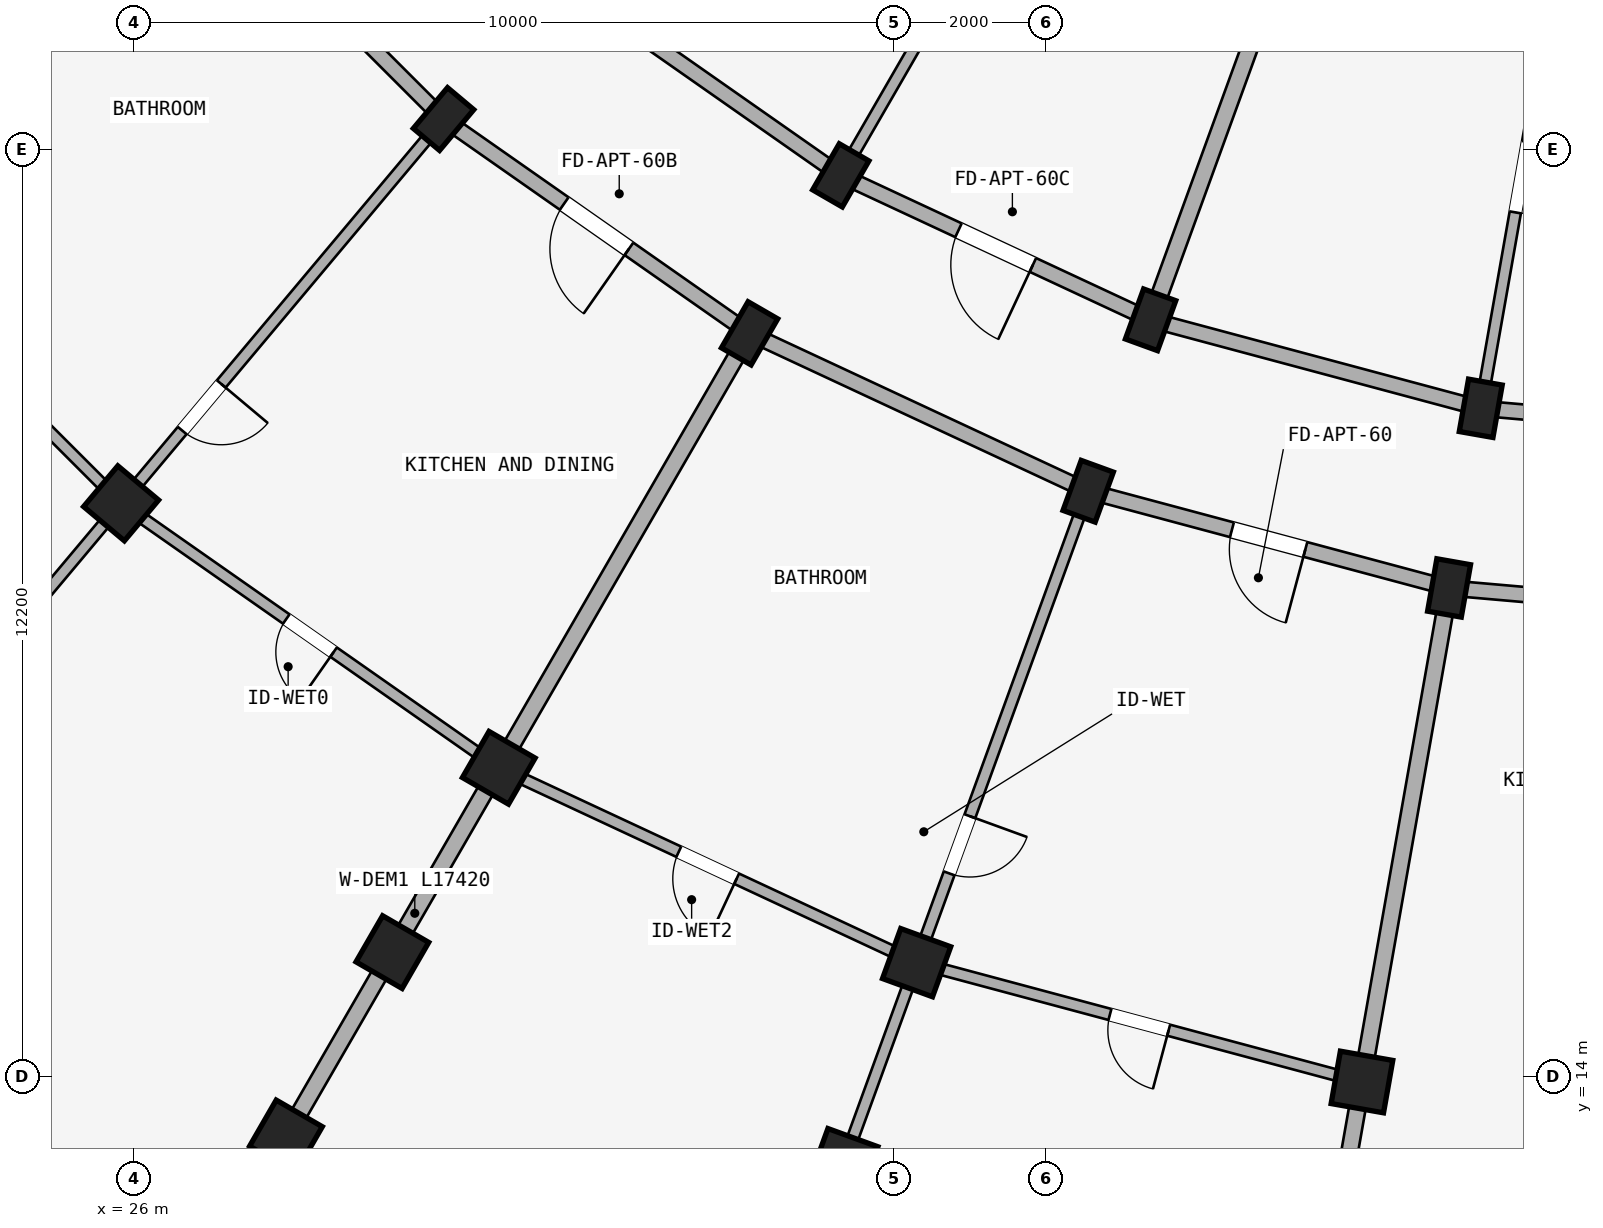
"""IFC4 building model, lengths in metres.
Left out: names, types, materials, properties, quantities, classifications, styles, units other than length and angle.
Written with IfcOpenShell. Run it as: python <this file> out.ifc"""

import sys

from ifc_helpers import new_model, si_unit, direction, frame, frame_2d, origin, origin_2d, place, context, subcontext, project, spatial, rectangle, extrude, element, fill, save


model = new_model("IFC4")
c1 = context("Model", 3, precision=1e-05, world=origin(), true_north=direction((0.0, 1.0)))
c2 = subcontext(c1, "Body", "Model", "MODEL_VIEW")
j1 = project(units=[si_unit("LENGTHUNIT", "METRE"), si_unit("PLANEANGLEUNIT", "RADIAN")], contexts=[c1])
p1 = place(None, origin())
s1 = spatial("IfcSite", under=j1, at=p1, CompositionType="ELEMENT")
p2 = place(p1, origin())
s2 = spatial("IfcBuilding", under=s1, at=p2, CompositionType="ELEMENT")
p3 = place(p2, frame((0.0, 0.0, 18.15)))
s3 = spatial("IfcBuildingStorey", under=s2, at=p3, CompositionType="ELEMENT", Elevation=18.15)
for number, where, z_axis, x_axis in (
    (1, (43.72, 22.792, 0.0), (0.0, 0.0, 1.0), (-0.985, 0.174, 0.0)),
    (2, (43.303, 20.428, 0.0), (0.0, 0.0, 1.0), (-0.985, 0.174, 0.0)),
):
    element("IfcColumn", number, at=place(p3, frame(where, z_axis=z_axis, x_axis=x_axis)), inside=s3, PredefinedType="COLUMN", context=c2, shape_type="SweptSolid", body=[
        extrude(rectangle(XDim=0.45, YDim=0.7, at=origin_2d()), origin(), (0.0, 0.0, 1.0), 2.93),
    ])
p4 = place(p3, frame((42.157, 13.929, 0.0), z_axis=(0.0, 0.0, 1.0), x_axis=(-0.984807753012, 0.173648177667, 0.0)))
e3 = element("IfcColumn", 3, at=p4, inside=s3, PredefinedType="COLUMN", context=c2, shape_type="SweptSolid", body=[
    extrude(rectangle(XDim=0.7, YDim=0.7, at=origin_2d()), origin(), (0.0, 0.0, 1.0), 2.93),
])
for number, where, z_axis, x_axis in (
    (4, (39.376, 23.956, 0.0), (0.0, 0.0, 1.0), (-0.94, 0.342, 0.0)),
    (5, (38.555, 21.701, 0.0), (0.0, 0.0, 1.0), (-0.94, 0.342, 0.0)),
):
    element("IfcColumn", number, at=place(p3, frame(where, z_axis=z_axis, x_axis=x_axis)), inside=s3, PredefinedType="COLUMN", context=c2, shape_type="SweptSolid", body=[
        extrude(rectangle(XDim=0.45, YDim=0.7, at=origin_2d()), origin(), (0.0, 0.0, 1.0), 2.93),
    ])
for number, where, z_axis, x_axis in (
    (6, (36.298, 15.499, 0.0), (0.0, 0.0, 1.0), (-0.94, 0.342, 0.0)),
    (7, (35.34, 12.868, 0.0), (0.0, 0.0, 1.0), (-0.94, 0.342, 0.0)),
):
    element("IfcColumn", number, at=place(p3, frame(where, z_axis=z_axis, x_axis=x_axis)), inside=s3, PredefinedType="COLUMN", context=c2, shape_type="SweptSolid", body=[
        extrude(rectangle(XDim=0.7, YDim=0.7, at=origin_2d()), origin(), (0.0, 0.0, 1.0), 2.93),
    ])
for number, where, z_axis, x_axis in (
    (8, (35.3, 25.856, 0.0), (0.0, 0.0, 1.0), (-0.866, 0.5, 0.0)),
    (9, (34.1, 23.778, 0.0), (0.0, 0.0, 1.0), (-0.866, 0.5, 0.0)),
):
    element("IfcColumn", number, at=place(p3, frame(where, z_axis=z_axis, x_axis=x_axis)), inside=s3, PredefinedType="COLUMN", context=c2, shape_type="SweptSolid", body=[
        extrude(rectangle(XDim=0.45, YDim=0.7, at=origin_2d()), origin(), (0.0, 0.0, 1.0), 2.93),
    ])
for number, where, z_axis, x_axis in (
    (10, (30.8, 18.062, 0.0), (0.0, 0.0, 1.0), (-0.866, 0.5, 0.0)),
    (11, (29.4, 15.637, 0.0), (0.0, 0.0, 1.0), (-0.866, 0.5, 0.0)),
    (12, (28.0, 13.213, 0.0), (0.0, 0.0, 1.0), (-0.866, 0.5, 0.0)),
):
    element("IfcColumn", number, at=place(p3, frame(where, z_axis=z_axis, x_axis=x_axis)), inside=s3, PredefinedType="COLUMN", context=c2, shape_type="SweptSolid", body=[
        extrude(rectangle(XDim=0.7, YDim=0.7, at=origin_2d()), origin(), (0.0, 0.0, 1.0), 2.93),
    ])
p5 = place(p3, frame((30.073, 26.598, 0.0), z_axis=(0.0, 0.0, 1.0), x_axis=(-0.766044443119, 0.642787609687, 0.0)))
e13 = element("IfcColumn", 13, at=p5, inside=s3, PredefinedType="COLUMN", context=c2, shape_type="SweptSolid", body=[
    extrude(rectangle(XDim=0.45, YDim=0.7, at=origin_2d()), origin(), (0.0, 0.0, 1.0), 2.93),
])
p6 = place(p3, frame((25.831, 21.542, 0.0), z_axis=(0.0, 0.0, 1.0), x_axis=(-0.766044443119, 0.642787609687, 0.0)))
e14 = element("IfcColumn", 14, at=p6, inside=s3, PredefinedType="COLUMN", context=c2, shape_type="SweptSolid", body=[
    extrude(rectangle(XDim=0.7, YDim=0.7, at=origin_2d()), origin(), (0.0, 0.0, 1.0), 2.93),
])
p7 = place(p3, frame((48.2, 22.4, 0.0), z_axis=(0.0, 0.0, 1.0), x_axis=(-0.996191949488, 0.087187153726, 0.0)))
e15 = element("IfcWall", 15, at=p7, inside=s3, PredefinedType="STANDARD", context=c2, shape_type="SweptSolid", body=[
    extrude(rectangle(XDim=4.497, YDim=0.2, at=frame_2d((2.249, 0.0))), origin(), (0.0, 0.0, 1.0), 2.372),
])
p8 = place(p7, frame((1.729, 0.0, 0.0)))
e16 = element("IfcOpeningElement", 16, at=p8, cuts=e15, PredefinedType="OPENING", context=c2, shape_type="SweptSolid", body=[
    extrude(rectangle(XDim=1.04, YDim=2.15, at=frame_2d((0.52, 1.075))), frame((0.0, 0.11, 0.0), z_axis=(0.0, -1.0, 0.0), x_axis=(1.0, 0.0, 0.0)), (0.0, 0.0, 1.0), 0.22),
])
p9 = place(p3, frame((48.2, 20.0, 0.0), z_axis=(0.0, 0.0, 1.0), x_axis=(-0.996193663584, 0.087167566415, 0.0)))
e17 = element("IfcWall", 17, at=p9, inside=s3, PredefinedType="STANDARD", context=c2, shape_type="SweptSolid", body=[
    extrude(rectangle(XDim=4.916, YDim=0.2, at=frame_2d((2.458, 0.0))), origin(), (0.0, 0.0, 1.0), 2.372),
])
p10 = place(p9, frame((1.888, 0.0, 0.0)))
e18 = element("IfcOpeningElement", 18, at=p10, cuts=e17, PredefinedType="OPENING", context=c2, shape_type="SweptSolid", body=[
    extrude(rectangle(XDim=1.14, YDim=2.15, at=frame_2d((0.57, 1.075))), frame((0.0, 0.11, 0.0), z_axis=(0.0, -1.0, 0.0), x_axis=(1.0, 0.0, 0.0)), (0.0, 0.0, 1.0), 0.22),
])
p11 = place(p3, frame((43.72, 22.792, 0.0), z_axis=(0.0, 0.0, 1.0), x_axis=(-0.965934240054, 0.258787642463, 0.0)))
e19 = element("IfcWall", 19, at=p11, inside=s3, PredefinedType="STANDARD", context=c2, shape_type="SweptSolid", body=[
    extrude(rectangle(XDim=4.497, YDim=0.2, at=frame_2d((2.249, 0.0))), origin(), (0.0, 0.0, 1.0), 2.372),
])
p12 = place(p3, frame((43.303, 20.428, 0.0), z_axis=(0.0, 0.0, 1.0), x_axis=(-0.965930095386, 0.258803112091, 0.0)))
e20 = element("IfcWall", 20, at=p12, inside=s3, PredefinedType="STANDARD", context=c2, shape_type="SweptSolid", body=[
    extrude(rectangle(XDim=4.916, YDim=0.2, at=frame_2d((2.458, 0.0))), origin(), (0.0, 0.0, 1.0), 2.372),
])
p13 = place(p12, frame((1.958, 0.0, 0.0)))
e21 = element("IfcOpeningElement", 21, at=p13, cuts=e20, PredefinedType="OPENING", context=c2, shape_type="SweptSolid", body=[
    extrude(rectangle(XDim=1.0, YDim=2.15, at=frame_2d((0.5, 1.075))), frame((0.0, 0.11, 0.0), z_axis=(0.0, -1.0, 0.0), x_axis=(1.0, 0.0, 0.0)), (0.0, 0.0, 1.0), 0.22),
])
p14 = place(p3, frame((39.376, 23.956, 0.0), z_axis=(0.0, 0.0, 1.0), x_axis=(-0.906307919131, 0.422617978463, 0.0)))
e22 = element("IfcWall", 22, at=p14, inside=s3, PredefinedType="STANDARD", context=c2, shape_type="SweptSolid", body=[
    extrude(rectangle(XDim=4.497, YDim=0.2, at=frame_2d((2.249, 0.0))), origin(), (0.0, 0.0, 1.0), 2.372),
])
p15 = place(p14, frame((1.709, 0.0, 0.0)))
e23 = element("IfcOpeningElement", 23, at=p15, cuts=e22, PredefinedType="OPENING", context=c2, shape_type="SweptSolid", body=[
    extrude(rectangle(XDim=1.08, YDim=2.15, at=frame_2d((0.54, 1.075))), frame((0.0, 0.11, 0.0), z_axis=(0.0, -1.0, 0.0), x_axis=(1.0, 0.0, 0.0)), (0.0, 0.0, 1.0), 0.22),
])
p16 = place(p3, frame((38.555, 21.701, 0.0), z_axis=(0.0, 0.0, 1.0), x_axis=(-0.906302381024, 0.422629854778, 0.0)))
e24 = element("IfcWall", 24, at=p16, inside=s3, PredefinedType="STANDARD", context=c2, shape_type="SweptSolid", body=[
    extrude(rectangle(XDim=4.915, YDim=0.2, at=frame_2d((2.458, 0.0))), origin(), (0.0, 0.0, 1.0), 2.372),
])
p17 = place(p3, frame((35.3, 25.856, 0.0), z_axis=(0.0, 0.0, 1.0), x_axis=(-0.819155404658, 0.573571637217, 0.0)))
e25 = element("IfcWall", 25, at=p17, inside=s3, PredefinedType="STANDARD", context=c2, shape_type="SweptSolid", body=[
    extrude(rectangle(XDim=4.497, YDim=0.2, at=frame_2d((2.249, 0.0))), origin(), (0.0, 0.0, 1.0), 2.372),
])
p18 = place(p3, frame((34.1, 23.778, 0.0), z_axis=(0.0, 0.0, 1.0), x_axis=(-0.819140911474, 0.573592335331, 0.0)))
e26 = element("IfcWall", 26, at=p18, inside=s3, PredefinedType="STANDARD", context=c2, shape_type="SweptSolid", body=[
    extrude(rectangle(XDim=4.916, YDim=0.2, at=frame_2d((2.458, 0.0))), origin(), (0.0, 0.0, 1.0), 2.372),
])
p19 = place(p18, frame((1.938, 0.0, 0.0)))
e27 = element("IfcOpeningElement", 27, at=p19, cuts=e26, PredefinedType="OPENING", context=c2, shape_type="SweptSolid", body=[
    extrude(rectangle(XDim=1.04, YDim=2.15, at=frame_2d((0.52, 1.075))), frame((0.0, 0.11, 0.0), z_axis=(0.0, -1.0, 0.0), x_axis=(1.0, 0.0, 0.0)), (0.0, 0.0, 1.0), 0.22),
])
p20 = place(p3, frame((30.073, 26.598, 0.0), z_axis=(0.0, 0.0, 1.0), x_axis=(-0.707106781187, 0.707106781187, 0.0)))
e28 = element("IfcWall", 28, at=p20, inside=s3, PredefinedType="STANDARD", context=c2, shape_type="SweptSolid", body=[
    extrude(rectangle(XDim=4.916, YDim=0.2, at=frame_2d((2.458, 0.0))), origin(), (0.0, 0.0, 1.0), 2.372),
])
p21 = place(p3, frame((44.901, 29.489, 0.0), z_axis=(0.0, 0.0, 1.0), x_axis=(-0.173647089161, -0.984807944945, 0.0)))
e29 = element("IfcWall", 29, at=p21, inside=s3, PredefinedType="PARTITIONING", context=c2, shape_type="SweptSolid", body=[
    extrude(rectangle(XDim=6.75, YDim=0.15, at=frame_2d((3.375, 0.0))), origin(), (0.0, 0.0, 1.0), 2.372),
])
p22 = place(p21, frame((3.242, 0.0, 0.0)))
e30 = element("IfcOpeningElement", 30, at=p22, cuts=e29, PredefinedType="OPENING", context=c2, shape_type="SweptSolid", body=[
    extrude(rectangle(XDim=0.94, YDim=2.1, at=frame_2d((0.47, 1.05))), frame((0.0, 0.085, 0.0), z_axis=(0.0, -1.0, 0.0), x_axis=(1.0, 0.0, 0.0)), (0.0, 0.0, 1.0), 0.17),
])
p23 = place(p3, frame((43.286, 20.33, 0.0), z_axis=(0.0, 0.0, 1.0), x_axis=(-0.173646216546, -0.984808098809, 0.0)))
e31 = element("IfcWall", 31, at=p23, inside=s3, PredefinedType="STANDARD", context=c2, shape_type="SweptSolid", body=[
    extrude(rectangle(XDim=17.42, YDim=0.22, at=frame_2d((8.71, 0.0))), origin(), (0.0, 0.0, 1.0), 2.372),
])
p24 = place(p3, frame((41.702, 30.346, 0.0), z_axis=(0.0, 0.0, 1.0), x_axis=(-0.342010221662, -0.939696231917, 0.0)))
e32 = element("IfcWall", 32, at=p24, inside=s3, PredefinedType="STANDARD", context=c2, shape_type="SweptSolid", body=[
    extrude(rectangle(XDim=6.75, YDim=0.22, at=frame_2d((3.375, 0.0))), origin(), (0.0, 0.0, 1.0), 2.372),
])
p25 = place(p3, frame((38.521, 21.607, 0.0), z_axis=(0.0, 0.0, 1.0), x_axis=(-0.342022120477, -0.939691901159, 0.0)))
e33 = element("IfcWall", 33, at=p25, inside=s3, PredefinedType="PARTITIONING", context=c2, shape_type="SweptSolid", body=[
    extrude(rectangle(XDim=17.42, YDim=0.15, at=frame_2d((8.71, 0.0))), origin(), (0.0, 0.0, 1.0), 2.372),
])
p26 = place(p25, frame((4.45, 0.0, 0.0)))
e34 = element("IfcOpeningElement", 34, at=p26, cuts=e33, PredefinedType="OPENING", context=c2, shape_type="SweptSolid", body=[
    extrude(rectangle(XDim=0.8, YDim=2.1, at=frame_2d((0.4, 1.05))), frame((0.0, 0.085, 0.0), z_axis=(0.0, -1.0, 0.0), x_axis=(1.0, 0.0, 0.0)), (0.0, 0.0, 1.0), 0.17),
])
p27 = place(p3, frame((38.7, 31.746, 0.0), z_axis=(0.0, 0.0, 1.0), x_axis=(-0.499997969693, -0.866026575979, 0.0)))
e35 = element("IfcWall", 35, at=p27, inside=s3, PredefinedType="PARTITIONING", context=c2, shape_type="SweptSolid", body=[
    extrude(rectangle(XDim=6.75, YDim=0.15, at=frame_2d((3.375, 0.0))), origin(), (0.0, 0.0, 1.0), 2.372),
])
p28 = place(p27, frame((3.262, 0.0, 0.0)))
e36 = element("IfcOpeningElement", 36, at=p28, cuts=e35, PredefinedType="OPENING", context=c2, shape_type="SweptSolid", body=[
    extrude(rectangle(XDim=0.9, YDim=2.1, at=frame_2d((0.45, 1.05))), frame((0.0, 0.085, 0.0), z_axis=(0.0, -1.0, 0.0), x_axis=(1.0, 0.0, 0.0)), (0.0, 0.0, 1.0), 0.17),
])
p29 = place(p3, frame((34.05, 23.691, 0.0), z_axis=(0.0, 0.0, 1.0), x_axis=(-0.499997843263, -0.866026648973, 0.0)))
e37 = element("IfcWall", 37, at=p29, inside=s3, PredefinedType="STANDARD", context=c2, shape_type="SweptSolid", body=[
    extrude(rectangle(XDim=17.42, YDim=0.22, at=frame_2d((8.71, 0.0))), origin(), (0.0, 0.0, 1.0), 2.372),
])
p30 = place(p3, frame((30.009, 26.521, 0.0), z_axis=(0.0, 0.0, 1.0), x_axis=(-0.642784757967, -0.766046835987, 0.0)))
e38 = element("IfcWall", 38, at=p30, inside=s3, PredefinedType="PARTITIONING", context=c2, shape_type="SweptSolid", body=[
    extrude(rectangle(XDim=17.42, YDim=0.15, at=frame_2d((8.71, 0.0))), origin(), (0.0, 0.0, 1.0), 2.372),
])
p31 = place(p30, frame((4.45, 0.0, 0.0)))
e39 = element("IfcOpeningElement", 39, at=p31, cuts=e38, PredefinedType="OPENING", context=c2, shape_type="SweptSolid", body=[
    extrude(rectangle(XDim=0.8, YDim=2.1, at=frame_2d((0.4, 1.05))), frame((0.0, 0.085, 0.0), z_axis=(0.0, -1.0, 0.0), x_axis=(1.0, 0.0, 0.0)), (0.0, 0.0, 1.0), 0.17),
])
p32 = place(p3, frame((26.521, 30.009, 0.0), z_axis=(0.0, 0.0, 1.0), x_axis=(-0.766046835987, -0.642784757967, 0.0)))
e40 = element("IfcWall", 40, at=p32, inside=s3, PredefinedType="STANDARD", context=c2, shape_type="SweptSolid", body=[
    extrude(rectangle(XDim=17.42, YDim=0.22, at=frame_2d((8.71, 0.0))), origin(), (0.0, 0.0, 1.0), 2.372),
])
p33 = place(p3, frame((42.157, 13.929, 0.0), z_axis=(0.0, 0.0, 1.0), x_axis=(-0.965923618901, 0.258827283048, 0.0)))
e41 = element("IfcWall", 41, at=p33, inside=s3, PredefinedType="PLUMBINGWALL", context=c2, shape_type="SweptSolid", body=[
    extrude(rectangle(XDim=6.066, YDim=0.15, at=frame_2d((3.033, 0.0))), origin(), (0.0, 0.0, 1.0), 2.372),
])
p34 = place(p33, frame((2.633, 0.0, 0.0)))
e42 = element("IfcOpeningElement", 42, at=p34, cuts=e41, PredefinedType="OPENING", context=c2, shape_type="SweptSolid", body=[
    extrude(rectangle(XDim=0.8, YDim=2.1, at=frame_2d((0.4, 1.05))), frame((0.0, 0.085, 0.0), z_axis=(0.0, -1.0, 0.0), x_axis=(1.0, 0.0, 0.0)), (0.0, 0.0, 1.0), 0.17),
])
p35 = place(p3, frame((36.298, 15.499, 0.0), z_axis=(0.0, 0.0, 1.0), x_axis=(-0.906312656069, 0.42260781991, 0.0)))
e43 = element("IfcWall", 43, at=p35, inside=s3, PredefinedType="PLUMBINGWALL", context=c2, shape_type="SweptSolid", body=[
    extrude(rectangle(XDim=6.066, YDim=0.15, at=frame_2d((3.033, 0.0))), origin(), (0.0, 0.0, 1.0), 2.372),
])
p36 = place(p35, frame((2.613, 0.0, 0.0)))
e44 = element("IfcOpeningElement", 44, at=p36, cuts=e43, PredefinedType="OPENING", context=c2, shape_type="SweptSolid", body=[
    extrude(rectangle(XDim=0.84, YDim=2.1, at=frame_2d((0.42, 1.05))), frame((0.0, 0.085, 0.0), z_axis=(0.0, -1.0, 0.0), x_axis=(1.0, 0.0, 0.0)), (0.0, 0.0, 1.0), 0.17),
])
p37 = place(p3, frame((30.8, 18.062, 0.0), z_axis=(0.0, 0.0, 1.0), x_axis=(-0.81913926159, 0.573594691504, 0.0)))
e45 = element("IfcWall", 45, at=p37, inside=s3, PredefinedType="PLUMBINGWALL", context=c2, shape_type="SweptSolid", body=[
    extrude(rectangle(XDim=6.066, YDim=0.15, at=frame_2d((3.033, 0.0))), origin(), (0.0, 0.0, 1.0), 2.372),
])
p38 = place(p37, frame((2.653, 0.0, 0.0)))
e46 = element("IfcOpeningElement", 46, at=p38, cuts=e45, PredefinedType="OPENING", context=c2, shape_type="SweptSolid", body=[
    extrude(rectangle(XDim=0.76, YDim=2.05, at=frame_2d((0.38, 1.025))), frame((0.0, 0.085, 0.0), z_axis=(0.0, -1.0, 0.0), x_axis=(1.0, 0.0, 0.0)), (0.0, 0.0, 1.0), 0.17),
])
p39 = place(p3, frame((25.831, 21.542, 0.0), z_axis=(0.0, 0.0, 1.0), x_axis=(-0.707106781187, 0.707106781187, 0.0)))
e47 = element("IfcWall", 47, at=p39, inside=s3, PredefinedType="PLUMBINGWALL", context=c2, shape_type="SweptSolid", body=[
    extrude(rectangle(XDim=6.066, YDim=0.15, at=frame_2d((3.033, 0.0))), origin(), (0.0, 0.0, 1.0), 2.372),
])
p40 = place(p39, frame((2.633, 0.0, 0.0)))
e48 = element("IfcOpeningElement", 48, at=p40, cuts=e47, PredefinedType="OPENING", context=c2, shape_type="SweptSolid", body=[
    extrude(rectangle(XDim=0.8, YDim=2.1, at=frame_2d((0.4, 1.05))), frame((0.0, 0.085, 0.0), z_axis=(0.0, -1.0, 0.0), x_axis=(1.0, 0.0, 0.0)), (0.0, 0.0, 1.0), 0.17),
])
p41 = place(p22, frame((0.94, 0.0, 0.0), z_axis=(0.0, 0.0, 1.0), x_axis=(-1.0, 0.0, 0.0)))
e49 = element("IfcDoor", 49, at=p41, inside=s3, OperationType="SINGLE_SWING_RIGHT", PredefinedType="DOOR", context=c2, shape_type="SweptSolid", body=[
    extrude(rectangle(XDim=0.94, YDim=2.1, at=frame_2d((0.47, 1.05))), frame((0.0, 0.025, 0.0), z_axis=(0.0, -1.0, 0.0), x_axis=(1.0, 0.0, 0.0)), (0.0, 0.0, 1.0), 0.05),
])
fill(e30, e49)
p42 = place(p26, origin())
e50 = element("IfcDoor", 50, at=p42, inside=s3, OperationType="SINGLE_SWING_LEFT", PredefinedType="DOOR", context=c2, shape_type="SweptSolid", body=[
    extrude(rectangle(XDim=0.8, YDim=2.1, at=frame_2d((0.4, 1.05))), frame((0.0, 0.025, 0.0), z_axis=(0.0, -1.0, 0.0), x_axis=(1.0, 0.0, 0.0)), (0.0, 0.0, 1.0), 0.05),
])
fill(e34, e50)
p43 = place(p31, frame((0.8, 0.0, 0.0), z_axis=(0.0, 0.0, 1.0), x_axis=(-1.0, 0.0, 0.0)))
e51 = element("IfcDoor", 51, at=p43, inside=s3, OperationType="SINGLE_SWING_RIGHT", PredefinedType="DOOR", context=c2, shape_type="SweptSolid", body=[
    extrude(rectangle(XDim=0.8, YDim=2.1, at=frame_2d((0.4, 1.05))), frame((0.0, 0.025, 0.0), z_axis=(0.0, -1.0, 0.0), x_axis=(1.0, 0.0, 0.0)), (0.0, 0.0, 1.0), 0.05),
])
fill(e39, e51)
p44 = place(p13, frame((1.0, 0.0, 0.0), z_axis=(0.0, 0.0, 1.0), x_axis=(-1.0, 0.0, 0.0)))
e52 = element("IfcDoor", 52, at=p44, inside=s3, OperationType="SINGLE_SWING_RIGHT", PredefinedType="DOOR", context=c2, shape_type="SweptSolid", body=[
    extrude(rectangle(XDim=1.0, YDim=2.15, at=frame_2d((0.5, 1.075))), frame((0.0, 0.025, 0.0), z_axis=(0.0, -1.0, 0.0), x_axis=(1.0, 0.0, 0.0)), (0.0, 0.0, 1.0), 0.05),
])
fill(e21, e52)
p45 = place(p34, origin())
e53 = element("IfcDoor", 53, at=p45, inside=s3, OperationType="SINGLE_SWING_LEFT", PredefinedType="DOOR", context=c2, shape_type="SweptSolid", body=[
    extrude(rectangle(XDim=0.8, YDim=2.1, at=frame_2d((0.4, 1.05))), frame((0.0, 0.025, 0.0), z_axis=(0.0, -1.0, 0.0), x_axis=(1.0, 0.0, 0.0)), (0.0, 0.0, 1.0), 0.05),
])
fill(e42, e53)
p46 = place(p36, frame((0.84, 0.0, 0.0), z_axis=(0.0, 0.0, 1.0), x_axis=(-1.0, 0.0, 0.0)))
e54 = element("IfcDoor", 54, at=p46, inside=s3, OperationType="SINGLE_SWING_RIGHT", PredefinedType="DOOR", context=c2, shape_type="SweptSolid", body=[
    extrude(rectangle(XDim=0.84, YDim=2.1, at=frame_2d((0.42, 1.05))), frame((0.0, 0.025, 0.0), z_axis=(0.0, -1.0, 0.0), x_axis=(1.0, 0.0, 0.0)), (0.0, 0.0, 1.0), 0.05),
])
fill(e44, e54)
p47 = place(p19, origin())
e55 = element("IfcDoor", 55, at=p47, inside=s3, OperationType="SINGLE_SWING_LEFT", PredefinedType="DOOR", context=c2, shape_type="SweptSolid", body=[
    extrude(rectangle(XDim=1.04, YDim=2.15, at=frame_2d((0.52, 1.075))), frame((0.0, 0.025, 0.0), z_axis=(0.0, -1.0, 0.0), x_axis=(1.0, 0.0, 0.0)), (0.0, 0.0, 1.0), 0.05),
])
fill(e27, e55)
p48 = place(p38, frame((0.76, 0.0, 0.0), z_axis=(0.0, 0.0, 1.0), x_axis=(-1.0, 0.0, 0.0)))
e56 = element("IfcDoor", 56, at=p48, inside=s3, OperationType="SINGLE_SWING_RIGHT", PredefinedType="DOOR", context=c2, shape_type="SweptSolid", body=[
    extrude(rectangle(XDim=0.76, YDim=2.05, at=frame_2d((0.38, 1.025))), frame((0.0, 0.025, 0.0), z_axis=(0.0, -1.0, 0.0), x_axis=(1.0, 0.0, 0.0)), (0.0, 0.0, 1.0), 0.05),
])
fill(e46, e56)
p49 = place(p15, origin())
e57 = element("IfcDoor", 57, at=p49, inside=s3, OperationType="SINGLE_SWING_LEFT", PredefinedType="DOOR", context=c2, shape_type="SweptSolid", body=[
    extrude(rectangle(XDim=1.08, YDim=2.15, at=frame_2d((0.54, 1.075))), frame((0.0, 0.025, 0.0), z_axis=(0.0, -1.0, 0.0), x_axis=(1.0, 0.0, 0.0)), (0.0, 0.0, 1.0), 0.05),
])
fill(e23, e57)
save(model, sys.argv[1])
